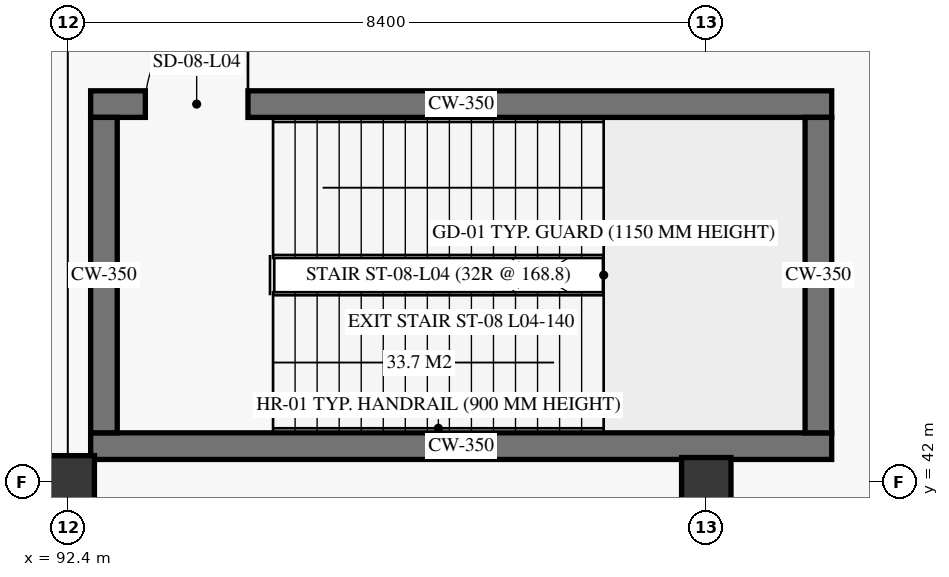
"""IFC4 building model, lengths in metres.
Left out: names, types, materials, properties, quantities, classifications, styles, units other than length and angle.
Written with IfcOpenShell. Run it as: python <this file> out.ifc"""

import sys

from ifc_helpers import new_model, si_unit, direction, frame, frame_2d, origin, origin_2d, place, context, subcontext, project, spatial, rectangle, extrude, element, fill, save


model = new_model("IFC4")
c1 = context("Model", 3, precision=1e-05, world=origin(), true_north=direction((0.0, 1.0)))
c2 = subcontext(c1, "Body", "Model", "MODEL_VIEW")
j1 = project(units=[si_unit("LENGTHUNIT", "METRE"), si_unit("PLANEANGLEUNIT", "RADIAN")], contexts=[c1])
p1 = place(None, origin())
s1 = spatial("IfcSite", under=j1, at=p1, CompositionType="ELEMENT")
p2 = place(p1, origin())
s2 = spatial("IfcBuilding", under=s1, at=p2, CompositionType="ELEMENT")
p3 = place(p2, frame((0.0, 0.0, 16.8)))
s3 = spatial("IfcBuildingStorey", under=s2, at=p3, CompositionType="ELEMENT", Elevation=16.8)
p4 = place(p3, frame((92.4, 42.0, 0.0), z_axis=(0.0, 0.0, 1.0), x_axis=(1.0, 0.0, 0.0)))
e1 = element("IfcColumn", 1, at=p4, inside=s3, PredefinedType="COLUMN", context=c2, shape_type="SweptSolid", body=[
    extrude(rectangle(XDim=0.7, YDim=0.7, at=origin_2d()), origin(), (0.0, 0.0, 1.0), 5.1),
])
p5 = place(p3, frame((100.8, 42.0, 0.0), z_axis=(0.0, 0.0, 1.0), x_axis=(1.0, 0.0, 0.0)))
e2 = element("IfcColumn", 2, at=p5, inside=s3, PredefinedType="COLUMN", context=c2, shape_type="SweptSolid", body=[
    extrude(rectangle(XDim=0.65, YDim=0.65, at=origin_2d()), origin(), (0.0, 0.0, 1.0), 5.1),
])
p6 = place(p3, frame((92.7, 42.475, 0.0), z_axis=(0.0, 0.0, 1.0), x_axis=(1.0, 0.0, 0.0)))
e3 = element("IfcWall", 3, at=p6, inside=s3, PredefinedType="SHEAR", context=c2, shape_type="SweptSolid", body=[
    extrude(rectangle(XDim=9.75, YDim=0.35, at=frame_2d((4.875, 0.0))), origin(), (0.0, 0.0, 1.0), 5.1),
])
p7 = place(p3, frame((92.7, 46.975, 0.0), z_axis=(0.0, 0.0, 1.0), x_axis=(1.0, 0.0, 0.0)))
e4 = element("IfcWall", 4, at=p7, inside=s3, PredefinedType="SHEAR", context=c2, shape_type="SweptSolid", body=[
    extrude(rectangle(XDim=9.75, YDim=0.35, at=frame_2d((4.875, 0.0))), origin(), (0.0, 0.0, 1.0), 5.1),
])
p8 = place(p7, frame((0.72, 0.0, 0.0)))
e5 = element("IfcOpeningElement", 5, at=p8, cuts=e4, PredefinedType="OPENING", context=c2, shape_type="SweptSolid", body=[
    extrude(rectangle(XDim=1.35, YDim=2.25, at=frame_2d((0.675, 1.125))), frame((0.0, 0.185, 0.0), z_axis=(0.0, -1.0, 0.0), x_axis=(1.0, 0.0, 0.0)), (0.0, 0.0, 1.0), 0.37),
])
for number, where, z_axis, x_axis in (
    (6, (92.875, 42.65, 0.0), (0.0, 0.0, 1.0), (0.0, 1.0, 0.0)),
    (7, (102.275, 42.65, 0.0), (0.0, 0.0, 1.0), (0.0, 1.0, 0.0)),
):
    element("IfcWall", number, at=place(p3, frame(where, z_axis=z_axis, x_axis=x_axis)), inside=s3, PredefinedType="SHEAR", context=c2, shape_type="SweptSolid", body=[
        extrude(rectangle(XDim=4.15, YDim=0.35, at=frame_2d((2.075, 0.0))), origin(), (0.0, 0.0, 1.0), 5.1),
    ])
p9 = place(p8, origin())
e8 = element("IfcDoor", 8, at=p9, inside=s3, OperationType="SINGLE_SWING_RIGHT", PredefinedType="DOOR", context=c2, shape_type="SweptSolid", body=[
    extrude(rectangle(XDim=1.35, YDim=2.25, at=frame_2d((0.675, 1.125))), frame((0.0, 0.025, 0.0), z_axis=(0.0, -1.0, 0.0), x_axis=(1.0, 0.0, 0.0)), (0.0, 0.0, 1.0), 0.05),
])
fill(e5, e8)
save(model, sys.argv[1])
